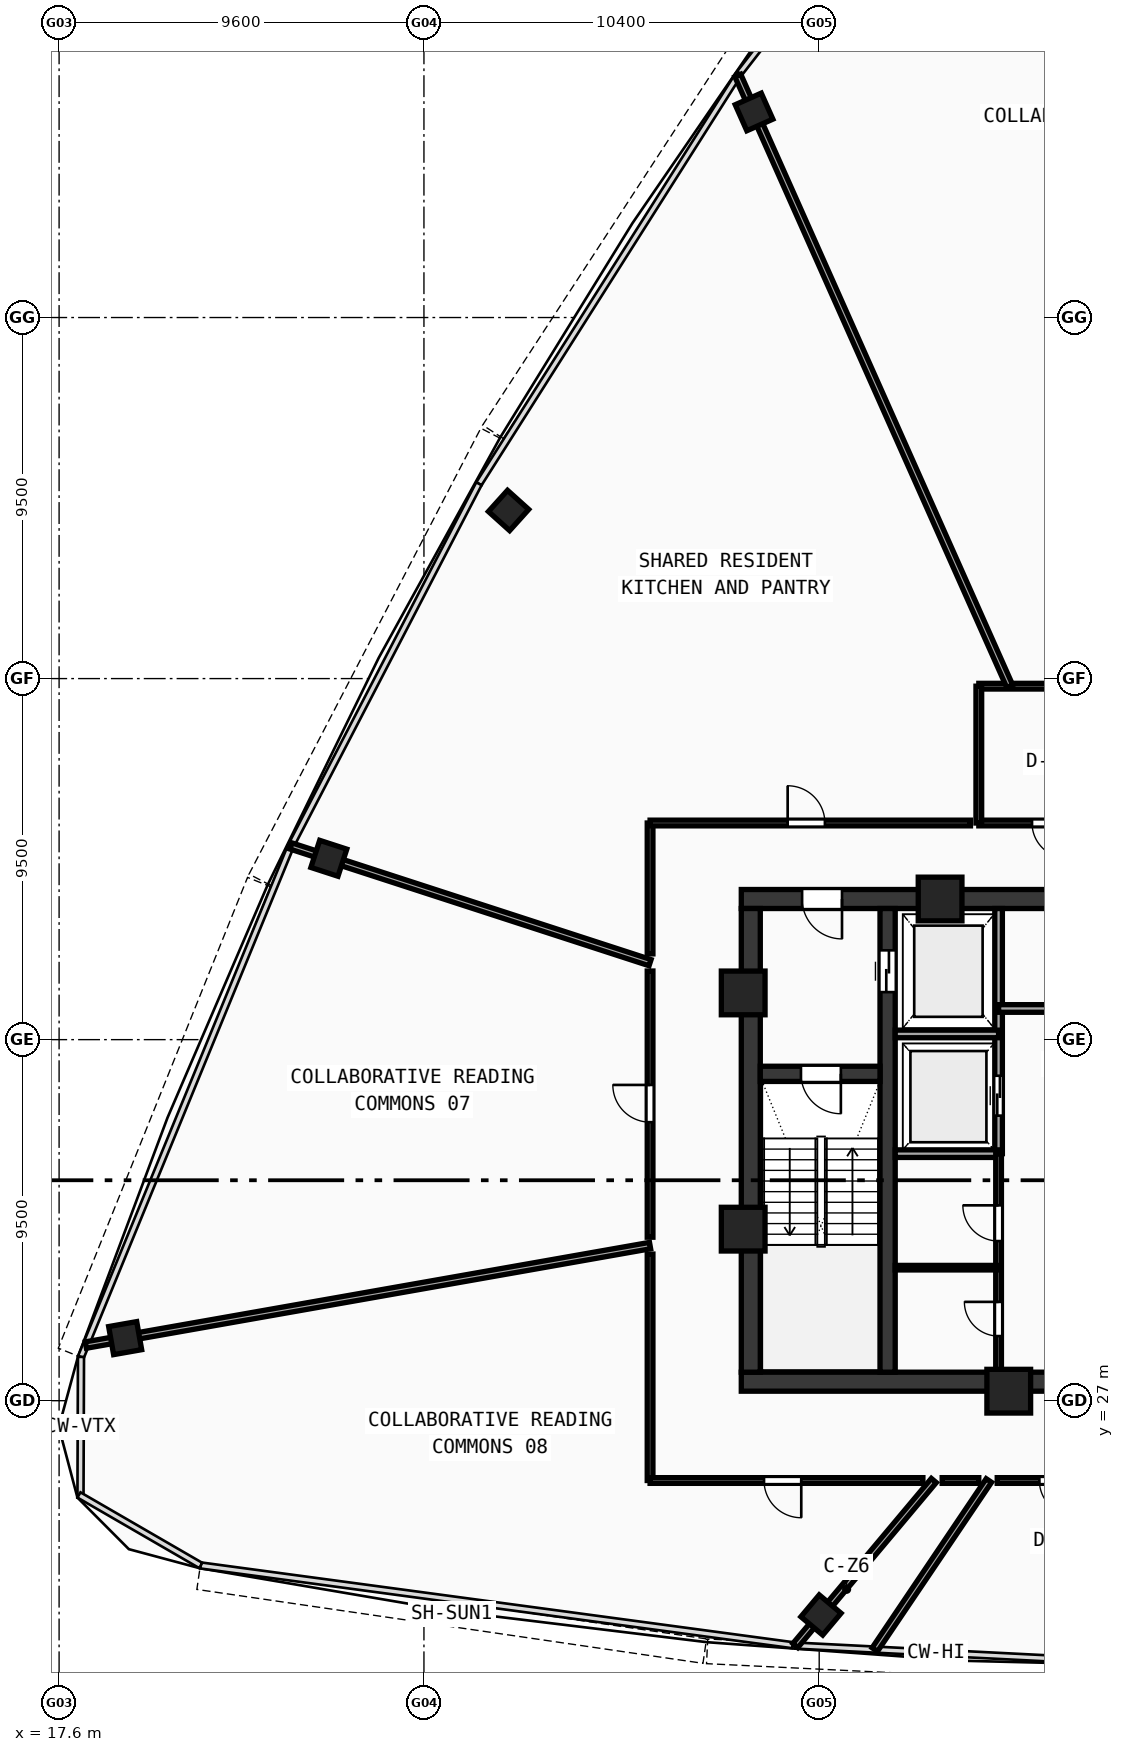
"""IFC4 building model, lengths in metres.
Left out: names, types, materials, properties, quantities, classifications, styles, units other than length and angle.
Written with IfcOpenShell. Run it as: python <this file> out.ifc"""

import sys

from ifc_helpers import new_model, si_unit, direction, frame, frame_2d, origin, origin_with_axes, origin_2d, place, context, subcontext, project, spatial, rectangle, hollow_rectangle, extrude, source, transform, mapped, element, fill, save


model = new_model("IFC4")
c1 = context("Model", 3, precision=1e-05, world=origin(), true_north=direction((0.0, 1.0)))
c2 = subcontext(c1, "Body", "Model", "MODEL_VIEW")
j1 = project(units=[si_unit("LENGTHUNIT", "METRE"), si_unit("PLANEANGLEUNIT", "RADIAN")], contexts=[c1])
p1 = place(None, origin())
s1 = spatial("IfcSite", under=j1, at=p1, CompositionType="ELEMENT")
p2 = place(p1, origin())
s2 = spatial("IfcBuilding", under=s1, at=p2, CompositionType="ELEMENT")
p3 = place(p2, frame((0.0, 0.0, 311.13)))
s3 = spatial("IfcBuildingStorey", under=s2, at=p3, CompositionType="ELEMENT", Elevation=311.13)
p4 = place(p3, frame((35.55, 27.5, 0.0), z_axis=(0.0, 0.0, 1.0), x_axis=(1.0, 0.0, 0.0)))
e1 = element("IfcWall", 1, at=p4, inside=s3, PredefinedType="SHEAR", context=c2, shape_type="SweptSolid", body=[
    extrude(rectangle(XDim=24.9, YDim=0.5, at=frame_2d((12.45, 0.0))), origin(), (0.0, 0.0, 1.0), 3.47),
])
p5 = place(p3, frame((35.55, 40.2, 0.0), z_axis=(0.0, 0.0, 1.0), x_axis=(1.0, 0.0, 0.0)))
e2 = element("IfcWall", 2, at=p5, inside=s3, PredefinedType="SHEAR", context=c2, shape_type="SweptSolid", body=[
    extrude(rectangle(XDim=11.25, YDim=0.5, at=frame_2d((5.625, 0.0))), origin(), (0.0, 0.0, 1.0), 3.47),
])
p6 = place(p5, frame((1.6, 0.0, 0.0)))
e3 = element("IfcOpeningElement", 3, at=p6, cuts=e2, PredefinedType="OPENING", context=c2, shape_type="SweptSolid", body=[
    extrude(rectangle(XDim=1.05, YDim=2.1, at=frame_2d((0.525, 1.05))), frame((0.0, 0.26, 0.0), z_axis=(0.0, -1.0, 0.0), x_axis=(1.0, 0.0, 0.0)), (0.0, 0.0, 1.0), 0.52),
])
p7 = place(p3, frame((35.8, 27.75, 0.0), z_axis=(0.0, 0.0, 1.0), x_axis=(0.0, 1.0, 0.0)))
e4 = element("IfcWall", 4, at=p7, inside=s3, PredefinedType="SHEAR", context=c2, shape_type="SweptSolid", body=[
    extrude(rectangle(XDim=12.2, YDim=0.5, at=frame_2d((6.1, 0.0))), origin(), (0.0, 0.0, 1.0), 3.47),
])
p8 = place(p3, frame((39.4, 27.75, 0.0), z_axis=(0.0, 0.0, 1.0), x_axis=(0.0, 1.0, 0.0)))
e5 = element("IfcWall", 5, at=p8, inside=s3, PredefinedType="SHEAR", context=c2, shape_type="SweptSolid", body=[
    extrude(rectangle(XDim=12.2, YDim=0.4, at=frame_2d((6.1, 0.0))), origin(), (0.0, 0.0, 1.0), 3.47),
])
p9 = place(p8, frame((10.0, 0.0, 0.0)))
e6 = element("IfcOpeningElement", 6, at=p9, cuts=e5, PredefinedType="OPENING", context=c2, shape_type="SweptSolid", body=[
    extrude(rectangle(XDim=1.1, YDim=2.1, at=frame_2d((0.55, 1.05))), frame((0.0, 0.21, 0.0), z_axis=(0.0, -1.0, 0.0), x_axis=(1.0, 0.0, 0.0)), (0.0, 0.0, 1.0), 0.42),
])
p10 = place(p3, frame((36.05, 35.6, 0.0), z_axis=(0.0, 0.0, 1.0), x_axis=(1.0, 0.0, 0.0)))
e7 = element("IfcWall", 7, at=p10, inside=s3, PredefinedType="SHEAR", context=c2, shape_type="SweptSolid", body=[
    extrude(rectangle(XDim=3.15, YDim=0.4, at=frame_2d((1.575, 0.0))), origin(), (0.0, 0.0, 1.0), 3.47),
])
p11 = place(p10, frame((1.07, 0.0, 0.0)))
e8 = element("IfcOpeningElement", 8, at=p11, cuts=e7, PredefinedType="OPENING", context=c2, shape_type="SweptSolid", body=[
    extrude(rectangle(XDim=1.05, YDim=2.1, at=frame_2d((0.525, 1.05))), frame((0.0, 0.21, 0.0), z_axis=(0.0, -1.0, 0.0), x_axis=(1.0, 0.0, 0.0)), (0.0, 0.0, 1.0), 0.42),
])
m1 = source(origin(), c2, "Body", "SweptSolid", [
    extrude(hollow_rectangle(XDim=1.15, YDim=1.15, WallThickness=0.048, at=origin_2d()), origin(), (0.0, 0.0, 1.0), 3.73),
])
for number, where, z_axis, x_axis in (
    (9, (42.588, 27.25, -0.26), (0.0, 0.0, 1.0), (1.0, 0.0, 0.0)),
    (10, (40.781, 40.2, -0.26), (0.0, 0.0, 1.0), (1.0, 0.0, 0.0)),
    (11, (35.6, 37.729, -0.26), (0.0, 0.0, 1.0), (1.0, 0.0, 0.0)),
    (12, (35.6, 31.513, -0.26), (0.0, 0.0, 1.0), (1.0, 0.0, 0.0)),
):
    element("IfcColumn", number, at=place(p3, frame(where, z_axis=z_axis, x_axis=x_axis)), inside=s3, PredefinedType="COLUMN", context=c2, shape_type="MappedRepresentation", body=[
        mapped(m1, transform((0.0, 0.0, 0.0), scale=1.0)),
    ])
m2 = source(origin(), c2, "Body", "SweptSolid", [
    extrude(hollow_rectangle(XDim=0.75, YDim=0.75, WallThickness=0.028, at=origin_2d()), origin(), (0.0, 0.0, 1.0), 3.73),
])
for number, where, z_axis, x_axis in (
    (13, (37.647, 21.362, -0.26), (0.0, 0.0, 1.0), (0.766, -0.643, 0.0)),
    (14, (35.886, 60.909, -0.26), (0.0, 0.0, 1.0), (-0.914, -0.407, 0.0)),
    (15, (29.427, 50.424, -0.26), (0.0, 0.0, 1.0), (-0.669, -0.743, 0.0)),
    (16, (24.698, 41.271, -0.26), (0.0, 0.0, 1.0), (-0.309, -0.951, 0.0)),
    (17, (19.338, 28.646, -0.26), (0.0, 0.0, 1.0), (0.174, -0.985, 0.0)),
):
    element("IfcColumn", number, at=place(p3, frame(where, z_axis=z_axis, x_axis=x_axis)), inside=s3, PredefinedType="COLUMN", context=c2, shape_type="MappedRepresentation", body=[
        mapped(m2, transform((0.0, 0.0, 0.0), scale=1.0)),
    ])
p12 = place(p3, frame((42.32, 33.5, 0.0), z_axis=(0.0, 0.0, 1.0), x_axis=(0.0, 1.0, 0.0)))
e18 = element("IfcWall", 18, at=p12, inside=s3, PredefinedType="SOLIDWALL", context=c2, shape_type="SweptSolid", body=[
    extrude(rectangle(XDim=6.45, YDim=0.2, at=frame_2d((3.225, 0.0))), origin(), (0.0, 0.0, 1.0), 3.47),
])
p13 = place(p12, frame((1.0, 0.0, 0.0)))
e19 = element("IfcOpeningElement", 19, at=p13, cuts=e18, PredefinedType="OPENING", context=c2, shape_type="SweptSolid", body=[
    extrude(rectangle(XDim=1.05, YDim=2.1, at=frame_2d((0.525, 1.05))), frame((0.0, 0.11, 0.0), z_axis=(0.0, -1.0, 0.0), x_axis=(1.0, 0.0, 0.0)), (0.0, 0.0, 1.0), 0.22),
])
for number, where, z_axis, x_axis in (
    (20, (39.6, 36.65, 0.0), (0.0, 0.0, 1.0), (1.0, 0.0, 0.0)),
    (21, (39.6, 33.5, 0.0), (0.0, 0.0, 1.0), (1.0, 0.0, 0.0)),
):
    element("IfcWall", number, at=place(p3, frame(where, z_axis=z_axis, x_axis=x_axis)), inside=s3, PredefinedType="SOLIDWALL", context=c2, shape_type="SweptSolid", body=[
        extrude(rectangle(XDim=2.72, YDim=0.2, at=frame_2d((1.36, 0.0))), origin(), (0.0, 0.0, 1.0), 3.47),
    ])
p14 = place(p3, frame((42.32, 37.32, 0.0), z_axis=(0.0, 0.0, 1.0), x_axis=(1.0, 0.0, 0.0)))
e22 = element("IfcWall", 22, at=p14, inside=s3, PredefinedType="SOLIDWALL", context=c2, shape_type="SweptSolid", body=[
    extrude(rectangle(XDim=4.73, YDim=0.2, at=frame_2d((2.365, 0.0))), origin(), (0.0, 0.0, 1.0), 3.47),
])
p15 = place(p14, frame((1.8, 0.0, 0.0)))
e23 = element("IfcOpeningElement", 23, at=p15, cuts=e22, PredefinedType="OPENING", context=c2, shape_type="SweptSolid", body=[
    extrude(rectangle(XDim=0.9, YDim=2.1, at=frame_2d((0.45, 1.05))), frame((0.0, 0.11, 0.0), z_axis=(0.0, -1.0, 0.0), x_axis=(1.0, 0.0, 0.0)), (0.0, 0.0, 1.0), 0.22),
])
p16 = place(p3, frame((42.32, 27.6, 0.0), z_axis=(0.0, 0.0, 1.0), x_axis=(0.0, 1.0, 0.0)))
e24 = element("IfcWall", 24, at=p16, inside=s3, PredefinedType="PARTITIONING", context=c2, shape_type="SweptSolid", body=[
    extrude(rectangle(XDim=5.9, YDim=0.15, at=frame_2d((2.95, 0.0))), origin(), (0.0, 0.0, 1.0), 3.47),
])
p17 = place(p16, frame((1.1, 0.0, 0.0)))
e25 = element("IfcOpeningElement", 25, at=p17, cuts=e24, PredefinedType="OPENING", context=c2, shape_type="SweptSolid", body=[
    extrude(rectangle(XDim=0.9, YDim=2.1, at=frame_2d((0.45, 1.05))), frame((0.0, 0.085, 0.0), z_axis=(0.0, -1.0, 0.0), x_axis=(1.0, 0.0, 0.0)), (0.0, 0.0, 1.0), 0.17),
])
p18 = place(p16, frame((3.6, 0.0, 0.0)))
e26 = element("IfcOpeningElement", 26, at=p18, cuts=e24, PredefinedType="OPENING", context=c2, shape_type="SweptSolid", body=[
    extrude(rectangle(XDim=0.94, YDim=2.1, at=frame_2d((0.47, 1.05))), frame((0.0, 0.085, 0.0), z_axis=(0.0, -1.0, 0.0), x_axis=(1.0, 0.0, 0.0)), (0.0, 0.0, 1.0), 0.17),
])
p19 = place(p3, frame((39.6, 30.5, 0.0), z_axis=(0.0, 0.0, 1.0), x_axis=(1.0, 0.0, 0.0)))
e27 = element("IfcWall", 27, at=p19, inside=s3, PredefinedType="PARTITIONING", context=c2, shape_type="SweptSolid", body=[
    extrude(rectangle(XDim=2.72, YDim=0.12, at=frame_2d((1.36, 0.0))), origin(), (0.0, 0.0, 1.0), 3.47),
])
p20 = place(p3, frame((41.8, 42.2, 0.0), z_axis=(0.0, 0.0, 1.0), x_axis=(1.0, 0.0, 0.0)))
e28 = element("IfcWall", 28, at=p20, inside=s3, PredefinedType="PARTITIONING", context=c2, shape_type="SweptSolid", body=[
    extrude(rectangle(XDim=5.3, YDim=0.15, at=frame_2d((2.65, 0.0))), origin(), (0.0, 0.0, 1.0), 2.87),
])
p21 = place(p20, frame((1.4, 0.0, 0.0)))
e29 = element("IfcOpeningElement", 29, at=p21, cuts=e28, PredefinedType="OPENING", context=c2, shape_type="SweptSolid", body=[
    extrude(rectangle(XDim=0.92, YDim=2.1, at=frame_2d((0.46, 1.05))), frame((0.0, 0.085, 0.0), z_axis=(0.0, -1.0, 0.0), x_axis=(1.0, 0.0, 0.0)), (0.0, 0.0, 1.0), 0.17),
])
p22 = place(p3, frame((41.8, 45.8, 0.0), z_axis=(0.0, 0.0, 1.0), x_axis=(1.0, 0.0, 0.0)))
e30 = element("IfcWall", 30, at=p22, inside=s3, PredefinedType="PARTITIONING", context=c2, shape_type="SweptSolid", body=[
    extrude(rectangle(XDim=5.3, YDim=0.15, at=frame_2d((2.65, 0.0))), origin(), (0.0, 0.0, 1.0), 2.87),
])
p23 = place(p3, frame((41.8, 42.2, 0.0), z_axis=(0.0, 0.0, 1.0), x_axis=(0.0, 1.0, 0.0)))
e31 = element("IfcWall", 31, at=p23, inside=s3, PredefinedType="PARTITIONING", context=c2, shape_type="SweptSolid", body=[
    extrude(rectangle(XDim=3.6, YDim=0.15, at=frame_2d((1.8, 0.0))), origin(), (0.0, 0.0, 1.0), 3.47),
])
p24 = place(p3, frame((42.613, 45.8, 0.0), z_axis=(0.0, 0.0, 1.0), x_axis=(-0.406746244391, 0.913541182801, 0.0)))
e32 = element("IfcWall", 32, at=p24, inside=s3, PredefinedType="PARTITIONING", context=c2, shape_type="SweptSolid", body=[
    extrude(rectangle(XDim=17.589, YDim=0.17, at=frame_2d((8.794, 0.0))), origin(), (0.0, 0.0, 1.0), 2.87),
])
p25 = place(p3, frame((33.15, 38.525, 0.0), z_axis=(0.0, 0.0, 1.0), x_axis=(-0.951056273407, 0.309017741906, 0.0)))
e33 = element("IfcWall", 33, at=p25, inside=s3, PredefinedType="PARTITIONING", context=c2, shape_type="SweptSolid", body=[
    extrude(rectangle(XDim=9.937, YDim=0.17, at=frame_2d((4.969, 0.0))), origin(), (0.0, 0.0, 1.0), 2.87),
])
p26 = place(p3, frame((33.15, 31.082, 0.0), z_axis=(0.0, 0.0, 1.0), x_axis=(-0.984808005161, -0.173646747654, 0.0)))
e34 = element("IfcWall", 34, at=p26, inside=s3, PredefinedType="PARTITIONING", context=c2, shape_type="SweptSolid", body=[
    extrude(rectangle(XDim=15.075, YDim=0.17, at=frame_2d((7.537, 0.0))), origin(), (0.0, 0.0, 1.0), 2.87),
])
p27 = place(p3, frame((40.616, 24.9, 0.0), z_axis=(0.0, 0.0, 1.0), x_axis=(-0.642790029712, -0.76604241247, 0.0)))
e35 = element("IfcWall", 35, at=p27, inside=s3, PredefinedType="PARTITIONING", context=c2, shape_type="SweptSolid", body=[
    extrude(rectangle(XDim=5.669, YDim=0.17, at=frame_2d((2.834, 0.0))), origin(), (0.0, 0.0, 1.0), 2.87),
])
p28 = place(p3, frame((42.064, 24.9, 0.0), z_axis=(0.0, 0.0, 1.0), x_axis=(-0.559175120789, -0.829049566848, 0.0)))
e36 = element("IfcWall", 36, at=p28, inside=s3, PredefinedType="PARTITIONING", context=c2, shape_type="SweptSolid", body=[
    extrude(rectangle(XDim=5.366, YDim=0.17, at=frame_2d((2.683, 0.0))), origin(), (0.0, 0.0, 1.0), 2.87),
])
p29 = place(p3, frame((33.15, 24.9, 0.0), z_axis=(0.0, 0.0, 1.0), x_axis=(0.0, 1.0, 0.0)))
e37 = element("IfcWall", 37, at=p29, inside=s3, PredefinedType="PARTITIONING", context=c2, shape_type="SweptSolid", body=[
    extrude(rectangle(XDim=5.958, YDim=0.15, at=frame_2d((2.979, 0.0))), origin(), (0.0, 0.0, 1.0), 3.12),
])
p30 = place(p3, frame((33.15, 31.301, 0.0), z_axis=(0.0, 0.0, 1.0), x_axis=(0.0, 1.0, 0.0)))
e38 = element("IfcWall", 38, at=p30, inside=s3, PredefinedType="PARTITIONING", context=c2, shape_type="SweptSolid", body=[
    extrude(rectangle(XDim=7.004, YDim=0.15, at=frame_2d((3.502, 0.0))), origin(), (0.0, 0.0, 1.0), 3.47),
])
p31 = place(p30, frame((3.027, 0.0, 0.0)))
e39 = element("IfcOpeningElement", 39, at=p31, cuts=e38, PredefinedType="OPENING", context=c2, shape_type="SweptSolid", body=[
    extrude(rectangle(XDim=0.98, YDim=2.12, at=frame_2d((0.49, 1.06))), frame((0.0, 0.085, 0.0), z_axis=(0.0, -1.0, 0.0), x_axis=(1.0, 0.0, 0.0)), (0.0, 0.0, 1.0), 0.17),
])
p32 = place(p3, frame((33.15, 38.756, 0.0), z_axis=(0.0, 0.0, 1.0), x_axis=(0.0, 1.0, 0.0)))
e40 = element("IfcWall", 40, at=p32, inside=s3, PredefinedType="PARTITIONING", context=c2, shape_type="SweptSolid", body=[
    extrude(rectangle(XDim=3.444, YDim=0.15, at=frame_2d((1.722, 0.0))), origin(), (0.0, 0.0, 1.0), 3.12),
])
p33 = place(p3, frame((33.15, 42.2, 0.0), z_axis=(0.0, 0.0, 1.0), x_axis=(1.0, 0.0, 0.0)))
e41 = element("IfcWall", 41, at=p33, inside=s3, PredefinedType="PARTITIONING", context=c2, shape_type="SweptSolid", body=[
    extrude(rectangle(XDim=8.43, YDim=0.15, at=frame_2d((4.215, 0.0))), origin(), (0.0, 0.0, 1.0), 2.87),
])
p34 = place(p33, frame((3.62, 0.0, 0.0)))
e42 = element("IfcOpeningElement", 42, at=p34, cuts=e41, PredefinedType="OPENING", context=c2, shape_type="SweptSolid", body=[
    extrude(rectangle(XDim=0.98, YDim=2.12, at=frame_2d((0.49, 1.06))), frame((0.0, 0.085, 0.0), z_axis=(0.0, -1.0, 0.0), x_axis=(1.0, 0.0, 0.0)), (0.0, 0.0, 1.0), 0.17),
])
p35 = place(p3, frame((45.414, 24.9, 0.0), z_axis=(0.0, 0.0, 1.0), x_axis=(-1.0, 0.0, 0.0)))
e43 = element("IfcWall", 43, at=p35, inside=s3, PredefinedType="PARTITIONING", context=c2, shape_type="SweptSolid", body=[
    extrude(rectangle(XDim=3.13, YDim=0.15, at=frame_2d((1.565, 0.0))), origin(), (0.0, 0.0, 1.0), 3.47),
])
p36 = place(p35, frame((1.101, 0.0, 0.0)))
e44 = element("IfcOpeningElement", 44, at=p36, cuts=e43, PredefinedType="OPENING", context=c2, shape_type="SweptSolid", body=[
    extrude(rectangle(XDim=0.92, YDim=2.1, at=frame_2d((0.46, 1.05))), frame((0.0, 0.085, 0.0), z_axis=(0.0, -1.0, 0.0), x_axis=(1.0, 0.0, 0.0)), (0.0, 0.0, 1.0), 0.17),
])
p37 = place(p3, frame((41.799, 24.9, 0.0), z_axis=(0.0, 0.0, 1.0), x_axis=(-1.0, 0.0, 0.0)))
e45 = element("IfcWall", 45, at=p37, inside=s3, PredefinedType="PARTITIONING", context=c2, shape_type="SweptSolid", body=[
    extrude(rectangle(XDim=0.963, YDim=0.15, at=frame_2d((0.481, 0.0))), origin(), (0.0, 0.0, 1.0), 3.47),
])
p38 = place(p3, frame((40.329, 24.9, 0.0), z_axis=(0.0, 0.0, 1.0), x_axis=(-1.0, 0.0, 0.0)))
e46 = element("IfcWall", 46, at=p38, inside=s3, PredefinedType="PARTITIONING", context=c2, shape_type="SweptSolid", body=[
    extrude(rectangle(XDim=7.179, YDim=0.15, at=frame_2d((3.589, 0.0))), origin(), (0.0, 0.0, 1.0), 3.12),
])
p39 = place(p38, frame((3.201, 0.0, 0.0)))
e47 = element("IfcOpeningElement", 47, at=p39, cuts=e46, PredefinedType="OPENING", context=c2, shape_type="SweptSolid", body=[
    extrude(rectangle(XDim=0.98, YDim=2.12, at=frame_2d((0.49, 1.06))), frame((0.0, 0.085, 0.0), z_axis=(0.0, -1.0, 0.0), x_axis=(1.0, 0.0, 0.0)), (0.0, 0.0, 1.0), 0.17),
])
m3 = source(origin(), c2, "Body", "SweptSolid", [
    extrude(rectangle(XDim=1.05, YDim=2.1, at=frame_2d((0.525, 1.05))), frame((0.0, 0.025, 0.0), z_axis=(0.0, -1.0, 0.0), x_axis=(1.0, 0.0, 0.0)), (0.0, 0.0, 1.0), 0.05),
])
p40 = place(p11, frame((1.05, 0.0, 0.0), z_axis=(0.0, 0.0, 1.0), x_axis=(-1.0, 0.0, 0.0)))
e48 = element("IfcDoor", 48, at=p40, inside=s3, OperationType="SINGLE_SWING_LEFT", PredefinedType="DOOR", context=c2, shape_type="MappedRepresentation", body=[
    mapped(m3, transform((0.0, 0.0, 0.0), scale=1.0)),
])
fill(e8, e48)
p41 = place(p6, frame((1.05, 0.0, 0.0), z_axis=(0.0, 0.0, 1.0), x_axis=(-1.0, 0.0, 0.0)))
e49 = element("IfcDoor", 49, at=p41, inside=s3, OperationType="SINGLE_SWING_LEFT", PredefinedType="DOOR", context=c2, shape_type="MappedRepresentation", body=[
    mapped(m3, transform((0.0, 0.0, 0.0), scale=1.0)),
])
fill(e3, e49)
m4 = source(origin(), c2, "Body", "SweptSolid", [
    extrude(rectangle(XDim=1.1, YDim=2.1, at=frame_2d((0.55, 1.05))), frame((0.0, 0.025, 0.0), z_axis=(0.0, -1.0, 0.0), x_axis=(1.0, 0.0, 0.0)), (0.0, 0.0, 1.0), 0.05),
])
p42 = place(p9, frame((1.1, 0.0, 0.0), z_axis=(0.0, 0.0, 1.0), x_axis=(-1.0, 0.0, 0.0)))
e50 = element("IfcDoor", 50, at=p42, inside=s3, OperationType="DOUBLE_DOOR_SLIDING", PredefinedType="DOOR", context=c2, shape_type="MappedRepresentation", body=[
    mapped(m4, transform((0.0, 0.0, 0.0), scale=1.0)),
])
fill(e6, e50)
p43 = place(p13, origin_with_axes())
e51 = element("IfcDoor", 51, at=p43, inside=s3, OperationType="DOUBLE_DOOR_SLIDING", PredefinedType="DOOR", context=c2, shape_type="MappedRepresentation", body=[
    mapped(m3, transform((0.0, 0.0, 0.0), scale=1.0)),
])
fill(e19, e51)
m5 = source(origin(), c2, "Body", "SweptSolid", [
    extrude(rectangle(XDim=0.9, YDim=2.1, at=frame_2d((0.45, 1.05))), frame((0.0, 0.025, 0.0), z_axis=(0.0, -1.0, 0.0), x_axis=(1.0, 0.0, 0.0)), (0.0, 0.0, 1.0), 0.05),
])
p44 = place(p17, origin_with_axes())
e52 = element("IfcDoor", 52, at=p44, inside=s3, OperationType="SINGLE_SWING_RIGHT", PredefinedType="DOOR", context=c2, shape_type="MappedRepresentation", body=[
    mapped(m5, transform((0.0, 0.0, 0.0), scale=1.0)),
])
fill(e25, e52)
m6 = source(origin(), c2, "Body", "SweptSolid", [
    extrude(rectangle(XDim=0.94, YDim=2.1, at=frame_2d((0.47, 1.05))), frame((0.0, 0.025, 0.0), z_axis=(0.0, -1.0, 0.0), x_axis=(1.0, 0.0, 0.0)), (0.0, 0.0, 1.0), 0.05),
])
p45 = place(p18, origin_with_axes())
e53 = element("IfcDoor", 53, at=p45, inside=s3, OperationType="SINGLE_SWING_RIGHT", PredefinedType="DOOR", context=c2, shape_type="MappedRepresentation", body=[
    mapped(m6, transform((0.0, 0.0, 0.0), scale=1.0)),
])
fill(e26, e53)
m7 = source(origin(), c2, "Body", "SweptSolid", [
    extrude(rectangle(XDim=0.92, YDim=2.1, at=frame_2d((0.46, 1.05))), frame((0.0, 0.025, 0.0), z_axis=(0.0, -1.0, 0.0), x_axis=(1.0, 0.0, 0.0)), (0.0, 0.0, 1.0), 0.05),
])
p46 = place(p21, frame((0.92, 0.0, 0.0), z_axis=(0.0, 0.0, 1.0), x_axis=(-1.0, 0.0, 0.0)))
e54 = element("IfcDoor", 54, at=p46, inside=s3, OperationType="SINGLE_SWING_LEFT", PredefinedType="DOOR", context=c2, shape_type="MappedRepresentation", body=[
    mapped(m7, transform((0.0, 0.0, 0.0), scale=1.0)),
])
fill(e29, e54)
m8 = source(origin(), c2, "Body", "SweptSolid", [
    extrude(rectangle(XDim=0.98, YDim=2.12, at=frame_2d((0.49, 1.06))), frame((0.0, 0.025, 0.0), z_axis=(0.0, -1.0, 0.0), x_axis=(1.0, 0.0, 0.0)), (0.0, 0.0, 1.0), 0.05),
])
p47 = place(p34, origin_with_axes())
e55 = element("IfcDoor", 55, at=p47, inside=s3, OperationType="SINGLE_SWING_LEFT", PredefinedType="DOOR", context=c2, shape_type="MappedRepresentation", body=[
    mapped(m8, transform((0.0, 0.0, 0.0), scale=1.0)),
])
fill(e42, e55)
p48 = place(p31, origin_with_axes())
e56 = element("IfcDoor", 56, at=p48, inside=s3, OperationType="SINGLE_SWING_RIGHT", PredefinedType="DOOR", context=c2, shape_type="MappedRepresentation", body=[
    mapped(m8, transform((0.0, 0.0, 0.0), scale=1.0)),
])
fill(e39, e56)
p49 = place(p39, origin_with_axes())
e57 = element("IfcDoor", 57, at=p49, inside=s3, OperationType="SINGLE_SWING_LEFT", PredefinedType="DOOR", context=c2, shape_type="MappedRepresentation", body=[
    mapped(m8, transform((0.0, 0.0, 0.0), scale=1.0)),
])
fill(e47, e57)
p50 = place(p36, origin_with_axes())
e58 = element("IfcDoor", 58, at=p50, inside=s3, OperationType="SINGLE_SWING_LEFT", PredefinedType="DOOR", context=c2, shape_type="MappedRepresentation", body=[
    mapped(m7, transform((0.0, 0.0, 0.0), scale=1.0)),
])
fill(e44, e58)
save(model, sys.argv[1])
